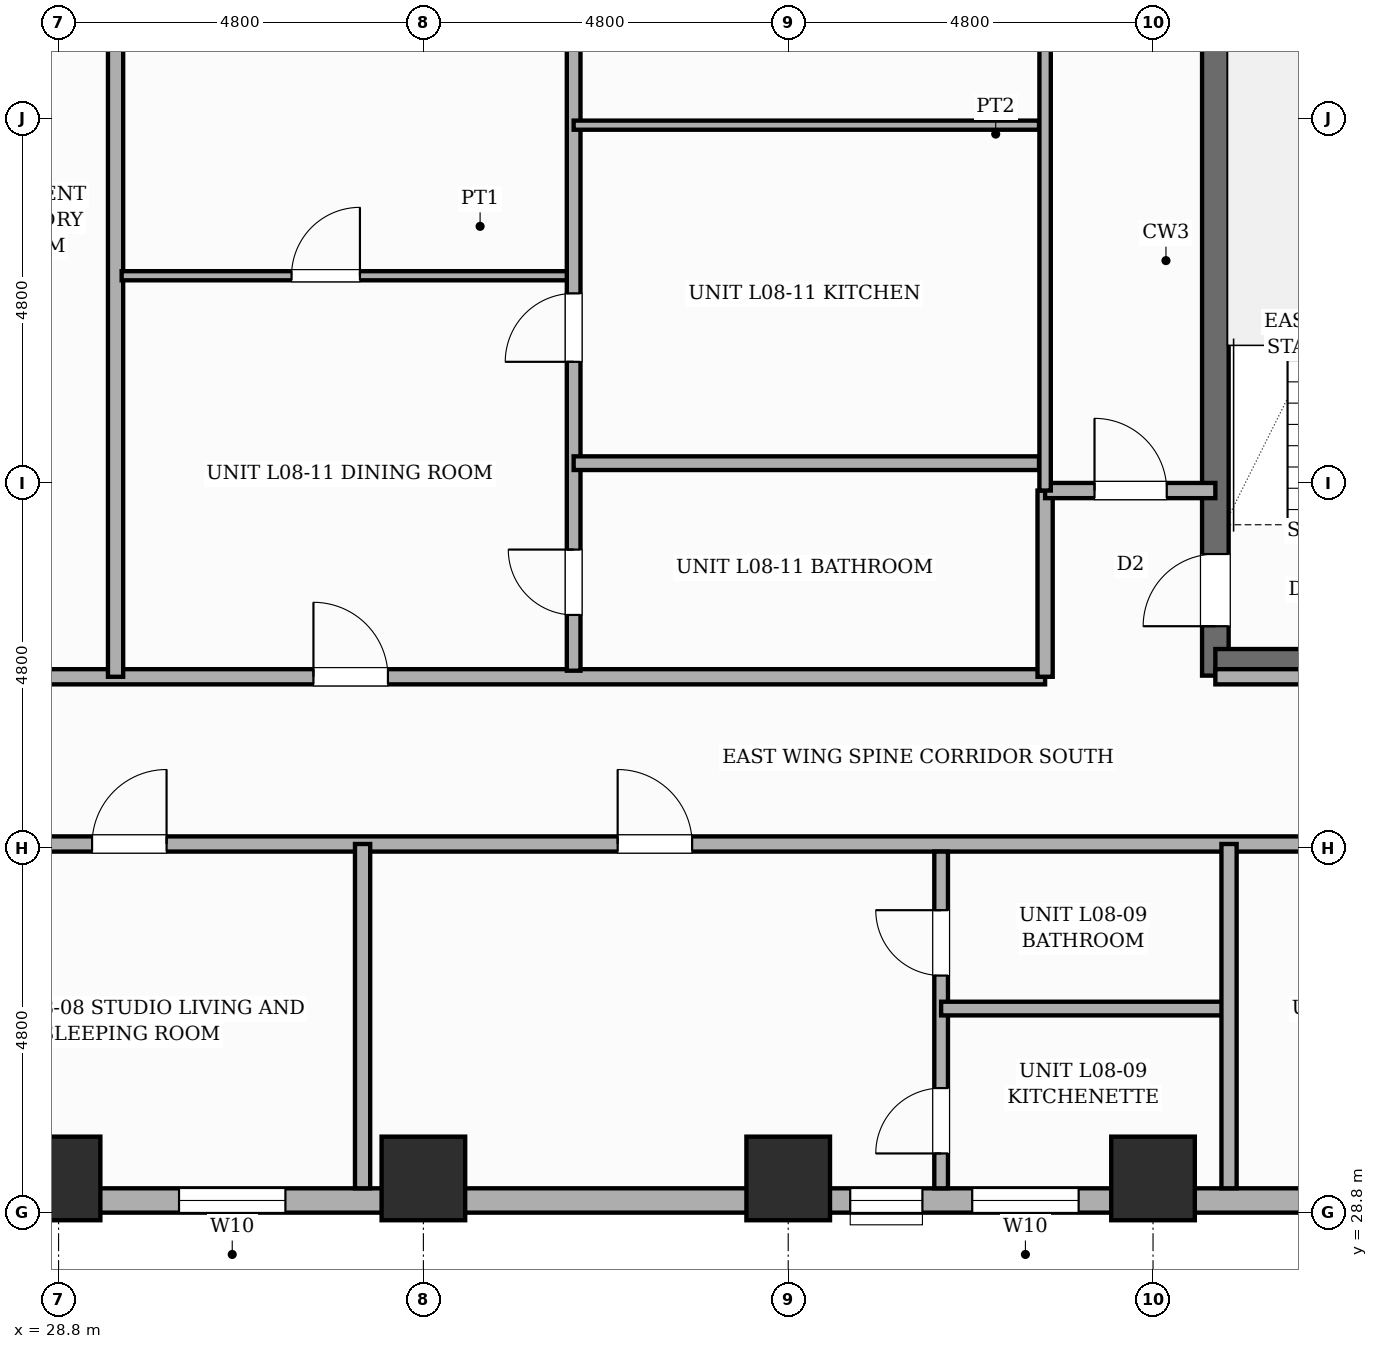
"""IFC4 building model, lengths in metres.
Left out: names, types, materials, properties, quantities, classifications, styles, units other than length and angle.
Written with IfcOpenShell. Run it as: python <this file> out.ifc"""

import sys

from ifc_helpers import new_model, si_unit, direction, frame, frame_2d, origin, origin_2d, place, context, subcontext, project, spatial, rectangle, extrude, element, fill, save


model = new_model("IFC4")
c1 = context("Model", 3, precision=1e-05, world=origin(), true_north=direction((0.0, 1.0)))
c2 = subcontext(c1, "Body", "Model", "MODEL_VIEW")
j1 = project(units=[si_unit("LENGTHUNIT", "METRE"), si_unit("PLANEANGLEUNIT", "RADIAN")], contexts=[c1])
p1 = place(None, origin())
s1 = spatial("IfcSite", under=j1, at=p1, CompositionType="ELEMENT")
p2 = place(p1, origin())
s2 = spatial("IfcBuilding", under=s1, at=p2, CompositionType="ELEMENT")
p3 = place(p2, frame((0.0, 0.0, 35.8)))
s3 = spatial("IfcBuildingStorey", under=s2, at=p3, CompositionType="ELEMENT", Elevation=35.8)
p4 = place(p3, frame((44.02, 35.865, 0.0), z_axis=(0.0, 0.0, 1.0), x_axis=(0.0, 1.0, 0.0)))
e1 = element("IfcWall", 1, at=p4, inside=s3, PredefinedType="SHEAR", context=c2, shape_type="SweptSolid", body=[
    extrude(rectangle(XDim=8.97, YDim=0.35, at=frame_2d((4.485, 0.0))), origin(), (0.0, 0.0, 1.0), 3.6),
])
p5 = place(p4, frame((0.65, 0.0, 0.0)))
e2 = element("IfcOpeningElement", 2, at=p5, cuts=e1, PredefinedType="OPENING", context=c2, shape_type="SweptSolid", body=[
    extrude(rectangle(XDim=0.95, YDim=2.1, at=frame_2d((0.475, 1.05))), frame((0.0, 0.185, 0.0), z_axis=(0.0, -1.0, 0.0), x_axis=(1.0, 0.0, 0.0)), (0.0, 0.0, 1.0), 0.37),
])
p6 = place(p3, frame((44.02, 36.04, 0.0), z_axis=(0.0, 0.0, 1.0), x_axis=(1.0, 0.0, 0.0)))
e3 = element("IfcWall", 3, at=p6, inside=s3, PredefinedType="SHEAR", context=c2, shape_type="SweptSolid", body=[
    extrude(rectangle(XDim=3.58, YDim=0.35, at=frame_2d((1.79, 0.0))), origin(), (0.0, 0.0, 1.0), 3.6),
])
for number, where, z_axis, x_axis in (
    (4, (28.8, 29.25, 0.0), (0.0, 0.0, 1.0), (1.0, 0.0, 0.0)),
    (5, (33.6, 29.25, 0.0), (0.0, 0.0, 1.0), (1.0, 0.0, 0.0)),
    (6, (38.4, 29.25, 0.0), (0.0, 0.0, 1.0), (1.0, 0.0, 0.0)),
    (7, (43.2, 29.25, 0.0), (0.0, 0.0, 1.0), (1.0, 0.0, 0.0)),
):
    element("IfcColumn", number, at=place(p3, frame(where, z_axis=z_axis, x_axis=x_axis)), inside=s3, PredefinedType="COLUMN", context=c2, shape_type="SweptSolid", body=[
        extrude(rectangle(XDim=1.1, YDim=1.1, at=origin_2d()), origin(), (0.0, 0.0, 1.0), 3.6),
    ])
p7 = place(p3, frame((55.2, 28.96, 0.0), z_axis=(0.0, 0.0, 1.0), x_axis=(-1.0, 0.0, 0.0)))
e8 = element("IfcWall", 8, at=p7, inside=s3, PredefinedType="STANDARD", context=c2, shape_type="SweptSolid", body=[
    extrude(rectangle(XDim=28.8, YDim=0.32, at=frame_2d((14.4, 0.0))), origin(), (0.0, 0.0, 1.0), 2.53),
])
p8 = place(p7, frame((23.415, 0.0, 0.65)))
e9 = element("IfcOpeningElement", 9, at=p8, cuts=e8, PredefinedType="OPENING", context=c2, shape_type="SweptSolid", body=[
    extrude(rectangle(XDim=1.4, YDim=1.1, at=frame_2d((0.7, 0.55))), frame((0.0, 0.17, 0.0), z_axis=(0.0, -1.0, 0.0), x_axis=(1.0, 0.0, 0.0)), (0.0, 0.0, 1.0), 0.34),
])
p9 = place(p7, frame((15.034, 0.0, 0.45)))
e10 = element("IfcOpeningElement", 10, at=p9, cuts=e8, PredefinedType="OPENING", context=c2, shape_type="SweptSolid", body=[
    extrude(rectangle(XDim=0.95, YDim=1.8, at=frame_2d((0.475, 0.9))), frame((0.0, 0.17, 0.0), z_axis=(0.0, -1.0, 0.0), x_axis=(1.0, 0.0, 0.0)), (0.0, 0.0, 1.0), 0.34),
])
p10 = place(p7, frame((5.25, 0.0, 0.45)))
e11 = element("IfcOpeningElement", 11, at=p10, cuts=e8, PredefinedType="OPENING", context=c2, shape_type="SweptSolid", body=[
    extrude(rectangle(XDim=0.95, YDim=1.8, at=frame_2d((0.475, 0.9))), frame((0.0, 0.17, 0.0), z_axis=(0.0, -1.0, 0.0), x_axis=(1.0, 0.0, 0.0)), (0.0, 0.0, 1.0), 0.34),
])
p11 = place(p7, frame((12.979, 0.0, 0.65)))
e12 = element("IfcOpeningElement", 12, at=p11, cuts=e8, PredefinedType="OPENING", context=c2, shape_type="SweptSolid", body=[
    extrude(rectangle(XDim=1.4, YDim=1.1, at=frame_2d((0.7, 0.55))), frame((0.0, 0.17, 0.0), z_axis=(0.0, -1.0, 0.0), x_axis=(1.0, 0.0, 0.0)), (0.0, 0.0, 1.0), 0.34),
])
p12 = place(p7, frame((0.47, 0.0, 0.65)))
e13 = element("IfcOpeningElement", 13, at=p12, cuts=e8, PredefinedType="OPENING", context=c2, shape_type="SweptSolid", body=[
    extrude(rectangle(XDim=1.4, YDim=1.1, at=frame_2d((0.7, 0.55))), frame((0.0, 0.17, 0.0), z_axis=(0.0, -1.0, 0.0), x_axis=(1.0, 0.0, 0.0)), (0.0, 0.0, 1.0), 0.34),
])
p13 = place(p3, frame((22.75, 33.65, 0.0), z_axis=(0.0, 0.0, 1.0), x_axis=(1.0, 0.0, 0.0)))
e14 = element("IfcWall", 14, at=p13, inside=s3, PredefinedType="PARTITIONING", context=c2, shape_type="SweptSolid", body=[
    extrude(rectangle(XDim=34.53, YDim=0.2, at=frame_2d((17.265, 0.0))), origin(), (0.0, 0.0, 1.0), 2.53),
])
p14 = place(p13, frame((6.491, 0.0, 0.0)))
e15 = element("IfcOpeningElement", 15, at=p14, cuts=e14, PredefinedType="OPENING", context=c2, shape_type="SweptSolid", body=[
    extrude(rectangle(XDim=0.98, YDim=2.18, at=frame_2d((0.49, 1.09))), frame((0.0, 0.11, 0.0), z_axis=(0.0, -1.0, 0.0), x_axis=(1.0, 0.0, 0.0)), (0.0, 0.0, 1.0), 0.22),
])
p15 = place(p13, frame((13.406, 0.0, 0.0)))
e16 = element("IfcOpeningElement", 16, at=p15, cuts=e14, PredefinedType="OPENING", context=c2, shape_type="SweptSolid", body=[
    extrude(rectangle(XDim=0.98, YDim=2.18, at=frame_2d((0.49, 1.09))), frame((0.0, 0.11, 0.0), z_axis=(0.0, -1.0, 0.0), x_axis=(1.0, 0.0, 0.0)), (0.0, 0.0, 1.0), 0.22),
])
p16 = place(p13, frame((24.09, 0.0, 0.0)))
e17 = element("IfcOpeningElement", 17, at=p16, cuts=e14, PredefinedType="OPENING", context=c2, shape_type="SweptSolid", body=[
    extrude(rectangle(XDim=0.98, YDim=2.18, at=frame_2d((0.49, 1.09))), frame((0.0, 0.11, 0.0), z_axis=(0.0, -1.0, 0.0), x_axis=(1.0, 0.0, 0.0)), (0.0, 0.0, 1.0), 0.22),
])
p17 = place(p3, frame((27.35, 35.85, 0.0), z_axis=(0.0, 0.0, 1.0), x_axis=(1.0, 0.0, 0.0)))
e18 = element("IfcWall", 18, at=p17, inside=s3, PredefinedType="PARTITIONING", context=c2, shape_type="SweptSolid", body=[
    extrude(rectangle(XDim=14.43, YDim=0.2, at=frame_2d((7.215, 0.0))), origin(), (0.0, 0.0, 1.0), 3.35),
])
p18 = place(p17, frame((4.803, 0.0, 0.0)))
e19 = element("IfcOpeningElement", 19, at=p18, cuts=e18, PredefinedType="OPENING", context=c2, shape_type="SweptSolid", body=[
    extrude(rectangle(XDim=0.98, YDim=2.18, at=frame_2d((0.49, 1.09))), frame((0.0, 0.11, 0.0), z_axis=(0.0, -1.0, 0.0), x_axis=(1.0, 0.0, 0.0)), (0.0, 0.0, 1.0), 0.22),
])
p19 = place(p3, frame((44.02, 35.85, 0.0), z_axis=(0.0, 0.0, 1.0), x_axis=(1.0, 0.0, 0.0)))
e20 = element("IfcWall", 20, at=p19, inside=s3, PredefinedType="PARTITIONING", context=c2, shape_type="SweptSolid", body=[
    extrude(rectangle(XDim=13.26, YDim=0.2, at=frame_2d((6.63, 0.0))), origin(), (0.0, 0.0, 1.0), 3.35),
])
p20 = place(p19, frame((4.549, 0.0, 0.0)))
e21 = element("IfcOpeningElement", 21, at=p20, cuts=e20, PredefinedType="OPENING", context=c2, shape_type="SweptSolid", body=[
    extrude(rectangle(XDim=0.98, YDim=2.18, at=frame_2d((0.49, 1.09))), frame((0.0, 0.11, 0.0), z_axis=(0.0, -1.0, 0.0), x_axis=(1.0, 0.0, 0.0)), (0.0, 0.0, 1.0), 0.22),
])
p21 = place(p3, frame((41.78, 35.85, 0.0), z_axis=(0.0, 0.0, 1.0), x_axis=(0.0, 1.0, 0.0)))
e22 = element("IfcWall", 22, at=p21, inside=s3, PredefinedType="PARTITIONING", context=c2, shape_type="SweptSolid", body=[
    extrude(rectangle(XDim=2.45, YDim=0.2, at=frame_2d((1.225, 0.0))), origin(), (0.0, 0.0, 1.0), 3.35),
])
p22 = place(p3, frame((41.78, 38.3, 0.0), z_axis=(0.0, 0.0, 1.0), x_axis=(1.0, 0.0, 0.0)))
e23 = element("IfcWall", 23, at=p22, inside=s3, PredefinedType="PARTITIONING", context=c2, shape_type="SweptSolid", body=[
    extrude(rectangle(XDim=2.24, YDim=0.2, at=frame_2d((1.12, 0.0))), origin(), (0.0, 0.0, 1.0), 3.35),
])
p23 = place(p22, frame((0.65, 0.0, 0.0)))
e24 = element("IfcOpeningElement", 24, at=p23, cuts=e23, PredefinedType="OPENING", context=c2, shape_type="SweptSolid", body=[
    extrude(rectangle(XDim=0.95, YDim=2.15, at=frame_2d((0.475, 1.075))), frame((0.0, 0.11, 0.0), z_axis=(0.0, -1.0, 0.0), x_axis=(1.0, 0.0, 0.0)), (0.0, 0.0, 1.0), 0.22),
])
p24 = place(p3, frame((32.8, 29.12, 0.0), z_axis=(0.0, 0.0, 1.0), x_axis=(0.0, 1.0, 0.0)))
e25 = element("IfcWall", 25, at=p24, inside=s3, PredefinedType="SOLIDWALL", context=c2, shape_type="SweptSolid", body=[
    extrude(rectangle(XDim=4.53, YDim=0.2, at=frame_2d((2.265, 0.0))), origin(), (0.0, 0.0, 1.0), 3.35),
])
p25 = place(p3, frame((40.412, 29.12, 0.0), z_axis=(0.0, 0.0, 1.0), x_axis=(0.0, 1.0, 0.0)))
e26 = element("IfcWall", 26, at=p25, inside=s3, PredefinedType="PLUMBINGWALL", context=c2, shape_type="SweptSolid", body=[
    extrude(rectangle(XDim=4.43, YDim=0.18, at=frame_2d((2.215, 0.0))), origin(), (0.0, 0.0, 1.0), 3.35),
])
p26 = place(p25, frame((0.459, 0.0, 0.0)))
e27 = element("IfcOpeningElement", 27, at=p26, cuts=e26, PredefinedType="OPENING", context=c2, shape_type="SweptSolid", body=[
    extrude(rectangle(XDim=0.86, YDim=2.1, at=frame_2d((0.43, 1.05))), frame((0.0, 0.1, 0.0), z_axis=(0.0, -1.0, 0.0), x_axis=(1.0, 0.0, 0.0)), (0.0, 0.0, 1.0), 0.2),
])
p27 = place(p25, frame((2.799, 0.0, 0.0)))
e28 = element("IfcOpeningElement", 28, at=p27, cuts=e26, PredefinedType="OPENING", context=c2, shape_type="SweptSolid", body=[
    extrude(rectangle(XDim=0.86, YDim=2.1, at=frame_2d((0.43, 1.05))), frame((0.0, 0.1, 0.0), z_axis=(0.0, -1.0, 0.0), x_axis=(1.0, 0.0, 0.0)), (0.0, 0.0, 1.0), 0.2),
])
p28 = place(p3, frame((40.412, 31.485, 0.0), z_axis=(0.0, 0.0, 1.0), x_axis=(1.0, 0.0, 0.0)))
e29 = element("IfcWall", 29, at=p28, inside=s3, PredefinedType="PLUMBINGWALL", context=c2, shape_type="SweptSolid", body=[
    extrude(rectangle(XDim=3.788, YDim=0.18, at=frame_2d((1.894, 0.0))), origin(), (0.0, 0.0, 1.0), 3.35),
])
p29 = place(p3, frame((44.2, 29.12, 0.0), z_axis=(0.0, 0.0, 1.0), x_axis=(0.0, 1.0, 0.0)))
e30 = element("IfcWall", 30, at=p29, inside=s3, PredefinedType="SOLIDWALL", context=c2, shape_type="SweptSolid", body=[
    extrude(rectangle(XDim=4.53, YDim=0.2, at=frame_2d((2.265, 0.0))), origin(), (0.0, 0.0, 1.0), 3.35),
])
p30 = place(p3, frame((29.55, 35.85, 0.0), z_axis=(0.0, 0.0, 1.0), x_axis=(0.0, 1.0, 0.0)))
e31 = element("IfcWall", 31, at=p30, inside=s3, PredefinedType="SOLIDWALL", context=c2, shape_type="SweptSolid", body=[
    extrude(rectangle(XDim=11.83, YDim=0.2, at=frame_2d((5.915, 0.0))), origin(), (0.0, 0.0, 1.0), 3.35),
])
p31 = place(p3, frame((29.63, 41.126, 0.0), z_axis=(0.0, 0.0, 1.0), x_axis=(1.0, 0.0, 0.0)))
e32 = element("IfcWall", 32, at=p31, inside=s3, PredefinedType="PARTITIONING", context=c2, shape_type="SweptSolid", body=[
    extrude(rectangle(XDim=5.947, YDim=0.12, at=frame_2d((2.974, 0.0))), origin(), (0.0, 0.0, 1.0), 3.35),
])
p32 = place(p31, frame((2.235, 0.0, 0.0)))
e33 = element("IfcOpeningElement", 33, at=p32, cuts=e32, PredefinedType="OPENING", context=c2, shape_type="SweptSolid", body=[
    extrude(rectangle(XDim=0.9, YDim=2.15, at=frame_2d((0.45, 1.075))), frame((0.0, 0.07, 0.0), z_axis=(0.0, -1.0, 0.0), x_axis=(1.0, 0.0, 0.0)), (0.0, 0.0, 1.0), 0.14),
])
p33 = place(p3, frame((35.577, 35.93, 0.0), z_axis=(0.0, 0.0, 1.0), x_axis=(0.0, 1.0, 0.0)))
e34 = element("IfcWall", 34, at=p33, inside=s3, PredefinedType="PLUMBINGWALL", context=c2, shape_type="SweptSolid", body=[
    extrude(rectangle(XDim=11.75, YDim=0.18, at=frame_2d((5.875, 0.0))), origin(), (0.0, 0.0, 1.0), 3.35),
])
p34 = place(p33, frame((0.733, 0.0, 0.0)))
e35 = element("IfcOpeningElement", 35, at=p34, cuts=e34, PredefinedType="OPENING", context=c2, shape_type="SweptSolid", body=[
    extrude(rectangle(XDim=0.86, YDim=2.1, at=frame_2d((0.43, 1.05))), frame((0.0, 0.1, 0.0), z_axis=(0.0, -1.0, 0.0), x_axis=(1.0, 0.0, 0.0)), (0.0, 0.0, 1.0), 0.2),
])
p35 = place(p33, frame((4.064, 0.0, 0.0)))
e36 = element("IfcOpeningElement", 36, at=p35, cuts=e34, PredefinedType="OPENING", context=c2, shape_type="SweptSolid", body=[
    extrude(rectangle(XDim=0.9, YDim=2.15, at=frame_2d((0.45, 1.075))), frame((0.0, 0.1, 0.0), z_axis=(0.0, -1.0, 0.0), x_axis=(1.0, 0.0, 0.0)), (0.0, 0.0, 1.0), 0.2),
])
p36 = place(p33, frame((8.789, 0.0, 0.0)))
e37 = element("IfcOpeningElement", 37, at=p36, cuts=e34, PredefinedType="OPENING", context=c2, shape_type="SweptSolid", body=[
    extrude(rectangle(XDim=0.9, YDim=2.15, at=frame_2d((0.45, 1.075))), frame((0.0, 0.1, 0.0), z_axis=(0.0, -1.0, 0.0), x_axis=(1.0, 0.0, 0.0)), (0.0, 0.0, 1.0), 0.2),
])
p37 = place(p3, frame((35.577, 38.66, 0.0), z_axis=(0.0, 0.0, 1.0), x_axis=(1.0, 0.0, 0.0)))
e38 = element("IfcWall", 38, at=p37, inside=s3, PredefinedType="PLUMBINGWALL", context=c2, shape_type="SweptSolid", body=[
    extrude(rectangle(XDim=6.123, YDim=0.18, at=frame_2d((3.062, 0.0))), origin(), (0.0, 0.0, 1.0), 3.35),
])
p38 = place(p3, frame((35.577, 43.107, 0.0), z_axis=(0.0, 0.0, 1.0), x_axis=(1.0, 0.0, 0.0)))
e39 = element("IfcWall", 39, at=p38, inside=s3, PredefinedType="PARTITIONING", context=c2, shape_type="SweptSolid", body=[
    extrude(rectangle(XDim=6.123, YDim=0.12, at=frame_2d((3.062, 0.0))), origin(), (0.0, 0.0, 1.0), 3.35),
])
p39 = place(p3, frame((41.78, 38.3, 0.0), z_axis=(0.0, 0.0, 1.0), x_axis=(0.0, 1.0, 0.0)))
e40 = element("IfcWall", 40, at=p39, inside=s3, PredefinedType="PARTITIONING", context=c2, shape_type="SweptSolid", body=[
    extrude(rectangle(XDim=9.38, YDim=0.15, at=frame_2d((4.69, 0.0))), origin(), (0.0, 0.0, 1.0), 3.35),
])
p40 = place(p8, origin())
e41 = element("IfcWindow", 41, at=p40, inside=s3, PartitioningType="SINGLE_PANEL", PredefinedType="WINDOW", context=c2, shape_type="SweptSolid", body=[
    extrude(rectangle(XDim=1.4, YDim=1.1, at=frame_2d((0.7, 0.55))), frame((0.0, 0.03, 0.0), z_axis=(0.0, -1.0, 0.0), x_axis=(1.0, 0.0, 0.0)), (0.0, 0.0, 1.0), 0.06),
])
fill(e9, e41)
p41 = place(p9, origin())
e42 = element("IfcWindow", 42, at=p41, inside=s3, PartitioningType="SINGLE_PANEL", PredefinedType="WINDOW", context=c2, shape_type="SweptSolid", body=[
    extrude(rectangle(XDim=0.95, YDim=1.8, at=frame_2d((0.475, 0.9))), frame((0.0, 0.03, 0.0), z_axis=(0.0, -1.0, 0.0), x_axis=(1.0, 0.0, 0.0)), (0.0, 0.0, 1.0), 0.06),
])
fill(e10, e42)
p42 = place(p11, origin())
e43 = element("IfcWindow", 43, at=p42, inside=s3, PartitioningType="SINGLE_PANEL", PredefinedType="WINDOW", context=c2, shape_type="SweptSolid", body=[
    extrude(rectangle(XDim=1.4, YDim=1.1, at=frame_2d((0.7, 0.55))), frame((0.0, 0.03, 0.0), z_axis=(0.0, -1.0, 0.0), x_axis=(1.0, 0.0, 0.0)), (0.0, 0.0, 1.0), 0.06),
])
fill(e12, e43)
p43 = place(p5, origin())
e44 = element("IfcDoor", 44, at=p43, inside=s3, OperationType="SINGLE_SWING_LEFT", PredefinedType="DOOR", context=c2, shape_type="SweptSolid", body=[
    extrude(rectangle(XDim=0.95, YDim=2.1, at=frame_2d((0.475, 1.05))), frame((0.0, 0.025, 0.0), z_axis=(0.0, -1.0, 0.0), x_axis=(1.0, 0.0, 0.0)), (0.0, 0.0, 1.0), 0.05),
])
fill(e2, e44)
p44 = place(p14, origin())
e45 = element("IfcDoor", 45, at=p44, inside=s3, OperationType="SINGLE_SWING_RIGHT", PredefinedType="DOOR", context=c2, shape_type="SweptSolid", body=[
    extrude(rectangle(XDim=0.98, YDim=2.18, at=frame_2d((0.49, 1.09))), frame((0.0, 0.025, 0.0), z_axis=(0.0, -1.0, 0.0), x_axis=(1.0, 0.0, 0.0)), (0.0, 0.0, 1.0), 0.05),
])
fill(e15, e45)
p45 = place(p15, origin())
e46 = element("IfcDoor", 46, at=p45, inside=s3, OperationType="SINGLE_SWING_LEFT", PredefinedType="DOOR", context=c2, shape_type="SweptSolid", body=[
    extrude(rectangle(XDim=0.98, YDim=2.18, at=frame_2d((0.49, 1.09))), frame((0.0, 0.025, 0.0), z_axis=(0.0, -1.0, 0.0), x_axis=(1.0, 0.0, 0.0)), (0.0, 0.0, 1.0), 0.05),
])
fill(e16, e46)
p46 = place(p26, origin())
e47 = element("IfcDoor", 47, at=p46, inside=s3, OperationType="SINGLE_SWING_LEFT", PredefinedType="DOOR", context=c2, shape_type="SweptSolid", body=[
    extrude(rectangle(XDim=0.86, YDim=2.1, at=frame_2d((0.43, 1.05))), frame((0.0, 0.025, 0.0), z_axis=(0.0, -1.0, 0.0), x_axis=(1.0, 0.0, 0.0)), (0.0, 0.0, 1.0), 0.05),
])
fill(e27, e47)
p47 = place(p27, origin())
e48 = element("IfcDoor", 48, at=p47, inside=s3, OperationType="SINGLE_SWING_RIGHT", PredefinedType="DOOR", context=c2, shape_type="SweptSolid", body=[
    extrude(rectangle(XDim=0.86, YDim=2.1, at=frame_2d((0.43, 1.05))), frame((0.0, 0.025, 0.0), z_axis=(0.0, -1.0, 0.0), x_axis=(1.0, 0.0, 0.0)), (0.0, 0.0, 1.0), 0.05),
])
fill(e28, e48)
p48 = place(p18, origin())
e49 = element("IfcDoor", 49, at=p48, inside=s3, OperationType="SINGLE_SWING_LEFT", PredefinedType="DOOR", context=c2, shape_type="SweptSolid", body=[
    extrude(rectangle(XDim=0.98, YDim=2.18, at=frame_2d((0.49, 1.09))), frame((0.0, 0.025, 0.0), z_axis=(0.0, -1.0, 0.0), x_axis=(1.0, 0.0, 0.0)), (0.0, 0.0, 1.0), 0.05),
])
fill(e19, e49)
p49 = place(p32, origin())
e50 = element("IfcDoor", 50, at=p49, inside=s3, OperationType="SINGLE_SWING_RIGHT", PredefinedType="DOOR", context=c2, shape_type="SweptSolid", body=[
    extrude(rectangle(XDim=0.9, YDim=2.15, at=frame_2d((0.45, 1.075))), frame((0.0, 0.025, 0.0), z_axis=(0.0, -1.0, 0.0), x_axis=(1.0, 0.0, 0.0)), (0.0, 0.0, 1.0), 0.05),
])
fill(e33, e50)
p50 = place(p34, origin())
e51 = element("IfcDoor", 51, at=p50, inside=s3, OperationType="SINGLE_SWING_RIGHT", PredefinedType="DOOR", context=c2, shape_type="SweptSolid", body=[
    extrude(rectangle(XDim=0.86, YDim=2.1, at=frame_2d((0.43, 1.05))), frame((0.0, 0.025, 0.0), z_axis=(0.0, -1.0, 0.0), x_axis=(1.0, 0.0, 0.0)), (0.0, 0.0, 1.0), 0.05),
])
fill(e35, e51)
p51 = place(p35, origin())
e52 = element("IfcDoor", 52, at=p51, inside=s3, OperationType="SINGLE_SWING_LEFT", PredefinedType="DOOR", context=c2, shape_type="SweptSolid", body=[
    extrude(rectangle(XDim=0.9, YDim=2.15, at=frame_2d((0.45, 1.075))), frame((0.0, 0.025, 0.0), z_axis=(0.0, -1.0, 0.0), x_axis=(1.0, 0.0, 0.0)), (0.0, 0.0, 1.0), 0.05),
])
fill(e36, e52)
p52 = place(p23, origin())
e53 = element("IfcDoor", 53, at=p52, inside=s3, OperationType="SINGLE_SWING_LEFT", PredefinedType="DOOR", context=c2, shape_type="SweptSolid", body=[
    extrude(rectangle(XDim=0.95, YDim=2.15, at=frame_2d((0.475, 1.075))), frame((0.0, 0.025, 0.0), z_axis=(0.0, -1.0, 0.0), x_axis=(1.0, 0.0, 0.0)), (0.0, 0.0, 1.0), 0.05),
])
fill(e24, e53)
save(model, sys.argv[1])
